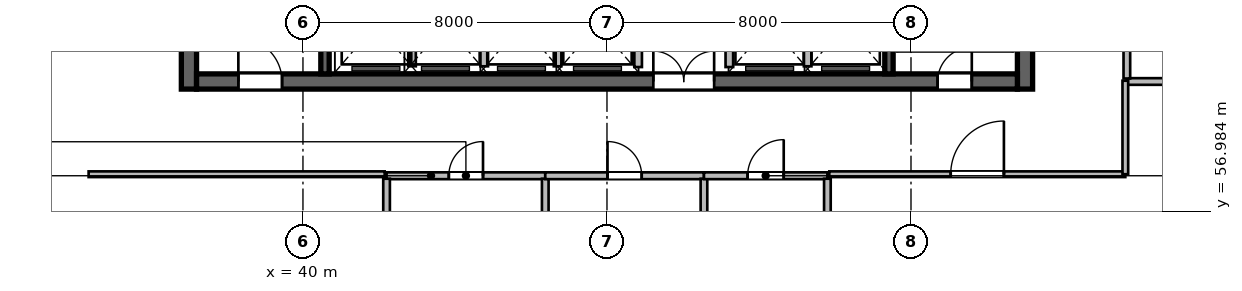
"""IFC4 building model, lengths in metres.
Left out: names, types, materials, properties, quantities, classifications, styles, units other than length and angle.
Written with IfcOpenShell. Run it as: python <this file> out.ifc"""

import sys

from ifc_helpers import new_model, si_unit, direction, frame, frame_2d, origin, place, context, subcontext, project, spatial, rectangle, extrude, source, transform, mapped, element, fill, save


model = new_model("IFC4")
c1 = context("Model", 3, precision=1e-05, world=origin(), true_north=direction((0.0, 1.0)))
c2 = subcontext(c1, "Body", "Model", "MODEL_VIEW")
j1 = project(units=[si_unit("LENGTHUNIT", "METRE"), si_unit("PLANEANGLEUNIT", "RADIAN")], contexts=[c1])
p1 = place(None, origin())
s1 = spatial("IfcSite", under=j1, at=p1, CompositionType="ELEMENT")
p2 = place(p1, origin())
s2 = spatial("IfcBuilding", under=s1, at=p2, CompositionType="ELEMENT")
p3 = place(p2, frame((0.0, 0.0, 303.0)))
s3 = spatial("IfcBuildingStorey", under=s2, at=p3, CompositionType="ELEMENT", Elevation=303.0)
m1 = source(origin(), c2, "Body", "SweptSolid", [
    extrude(rectangle(XDim=12.0, YDim=0.4, at=frame_2d((6.0, 0.0))), origin(), (0.0, 0.0, 1.0), 4.8),
])
for number, where, z_axis, x_axis in (
    (1, (37.0, 60.2, 0.0), (0.0, 0.0, 1.0), (0.0, 1.0, 0.0)),
    (2, (59.0, 60.2, 0.0), (0.0, 0.0, 1.0), (0.0, 1.0, 0.0)),
):
    element("IfcWall", number, at=place(p3, frame(where, z_axis=z_axis, x_axis=x_axis)), inside=s3, PredefinedType="SHEAR", context=c2, shape_type="MappedRepresentation", body=[
        mapped(m1, transform((0.0, 0.0, 0.0), scale=1.0)),
    ])
m2 = source(origin(), c2, "Body", "SweptSolid", [
    extrude(rectangle(XDim=21.6, YDim=0.4, at=frame_2d((10.8, 0.0))), origin(), (0.0, 0.0, 1.0), 4.8),
])
p4 = place(p3, frame((37.2, 60.4, 0.0), z_axis=(0.0, 0.0, 1.0), x_axis=(1.0, 0.0, 0.0)))
e3 = element("IfcWall", 3, at=p4, inside=s3, PredefinedType="SHEAR", context=c2, shape_type="MappedRepresentation", body=[
    mapped(m2, transform((0.0, 0.0, 0.0), scale=1.0)),
])
p5 = place(p4, frame((1.1, 0.0, 0.0)))
e4 = element("IfcOpeningElement", 4, at=p5, cuts=e3, PredefinedType="OPENING", context=c2, shape_type="SweptSolid", body=[
    extrude(rectangle(XDim=1.15, YDim=2.15, at=frame_2d((0.575, 1.075))), frame((0.0, 0.21, 0.0), z_axis=(0.0, -1.0, 0.0), x_axis=(1.0, 0.0, 0.0)), (0.0, 0.0, 1.0), 0.42),
])
p6 = place(p4, frame((19.5, 0.0, 0.0)))
e5 = element("IfcOpeningElement", 5, at=p6, cuts=e3, PredefinedType="OPENING", context=c2, shape_type="SweptSolid", body=[
    extrude(rectangle(XDim=0.9, YDim=2.1, at=frame_2d((0.45, 1.05))), frame((0.0, 0.21, 0.0), z_axis=(0.0, -1.0, 0.0), x_axis=(1.0, 0.0, 0.0)), (0.0, 0.0, 1.0), 0.42),
])
p7 = place(p4, frame((12.02, 0.0, 0.0)))
e6 = element("IfcOpeningElement", 6, at=p7, cuts=e3, PredefinedType="OPENING", context=c2, shape_type="SweptSolid", body=[
    extrude(rectangle(XDim=1.6, YDim=2.15, at=frame_2d((0.8, 1.075))), frame((0.0, 0.21, 0.0), z_axis=(0.0, -1.0, 0.0), x_axis=(1.0, 0.0, 0.0)), (0.0, 0.0, 1.0), 0.42),
])
m3 = source(origin(), c2, "Body", "SweptSolid", [
    extrude(rectangle(XDim=11.2, YDim=0.22, at=frame_2d((5.6, 0.0))), origin(), (0.0, 0.0, 1.0), 4.8),
])
p8 = place(p3, frame((40.58, 60.6, 0.0), z_axis=(0.0, 0.0, 1.0), x_axis=(0.0, 1.0, 0.0)))
e7 = element("IfcWall", 7, at=p8, inside=s3, PredefinedType="SHEAR", context=c2, shape_type="MappedRepresentation", body=[
    mapped(m3, transform((0.0, 0.0, 0.0), scale=1.0)),
])
p9 = place(p3, frame((55.42, 60.6, 0.0), z_axis=(0.0, 0.0, 1.0), x_axis=(0.0, 1.0, 0.0)))
e8 = element("IfcWall", 8, at=p9, inside=s3, PredefinedType="SHEAR", context=c2, shape_type="MappedRepresentation", body=[
    mapped(m3, transform((0.0, 0.0, 0.0), scale=1.0)),
])
p10 = place(p9, frame((9.645, 0.0, 0.0)))
e9 = element("IfcOpeningElement", 9, at=p10, cuts=e8, PredefinedType="OPENING", context=c2, shape_type="SweptSolid", body=[
    extrude(rectangle(XDim=1.15, YDim=2.15, at=frame_2d((0.575, 1.075))), frame((0.0, 0.12, 0.0), z_axis=(0.0, -1.0, 0.0), x_axis=(1.0, 0.0, 0.0)), (0.0, 0.0, 1.0), 0.24),
])
m4 = source(origin(), c2, "Body", "SweptSolid", [
    extrude(rectangle(XDim=2.24, YDim=0.2, at=frame_2d((1.12, 0.0))), origin(), (0.0, 0.0, 1.0), 4.54),
])
for number, where, z_axis, x_axis in (
    (10, (48.82, 60.78, 0.0), (0.0, 0.0, 1.0), (0.0, 1.0, 0.0)),
    (11, (51.22, 60.78, 0.0), (0.0, 0.0, 1.0), (0.0, 1.0, 0.0)),
):
    element("IfcWall", number, at=place(p3, frame(where, z_axis=z_axis, x_axis=x_axis)), inside=s3, PredefinedType="SOLIDWALL", context=c2, shape_type="MappedRepresentation", body=[
        mapped(m4, transform((0.0, 0.0, 0.0), scale=1.0)),
    ])
m5 = source(origin(), c2, "Body", "SweptSolid", [
    extrude(rectangle(XDim=2.2, YDim=0.2, at=frame_2d((1.1, 0.0))), origin(), (0.0, 0.0, 1.0), 4.54),
])
for number, where, z_axis, x_axis in (
    (12, (42.87, 60.8, 0.0), (0.0, 0.0, 1.0), (0.0, 1.0, 0.0)),
    (13, (44.77, 60.8, 0.0), (0.0, 0.0, 1.0), (0.0, 1.0, 0.0)),
    (14, (46.7, 60.8, 0.0), (0.0, 0.0, 1.0), (0.0, 1.0, 0.0)),
    (15, (53.28, 60.8, 0.0), (0.0, 0.0, 1.0), (0.0, 1.0, 0.0)),
):
    element("IfcWall", number, at=place(p3, frame(where, z_axis=z_axis, x_axis=x_axis)), inside=s3, PredefinedType="SOLIDWALL", context=c2, shape_type="MappedRepresentation", body=[
        mapped(m5, transform((0.0, 0.0, 0.0), scale=1.0)),
    ])
m6 = source(origin(), c2, "Body", "SweptSolid", [
    extrude(rectangle(XDim=4.176, YDim=0.18, at=frame_2d((2.088, 0.0))), origin(), (0.0, 0.0, 1.0), 4.54),
])
p11 = place(p3, frame((42.2, 57.92, 0.0), z_axis=(0.0, 0.0, 1.0), x_axis=(1.0, 0.0, 0.0)))
e16 = element("IfcWall", 16, at=p11, inside=s3, PredefinedType="PLUMBINGWALL", context=c2, shape_type="MappedRepresentation", body=[
    mapped(m6, transform((0.0, 0.0, 0.0), scale=1.0)),
])
p12 = place(p11, frame((1.638, 0.0, 0.0)))
e17 = element("IfcOpeningElement", 17, at=p12, cuts=e16, PredefinedType="OPENING", context=c2, shape_type="SweptSolid", body=[
    extrude(rectangle(XDim=0.9, YDim=2.08, at=frame_2d((0.45, 1.04))), frame((0.0, 0.1, 0.0), z_axis=(0.0, -1.0, 0.0), x_axis=(1.0, 0.0, 0.0)), (0.0, 0.0, 1.0), 0.2),
])
m7 = source(origin(), c2, "Body", "SweptSolid", [
    extrude(rectangle(XDim=3.763, YDim=0.175, at=frame_2d((1.881, 0.0))), origin(), (0.0, 0.0, 1.0), 4.54),
])
for number, where, z_axis, x_axis in (
    (18, (42.2, 54.079, 0.0), (0.0, 0.0, 1.0), (0.0, 1.0, 0.0)),
    (19, (46.376, 54.079, 0.0), (0.0, 0.0, 1.0), (0.0, 1.0, 0.0)),
):
    element("IfcWall", number, at=place(p3, frame(where, z_axis=z_axis, x_axis=x_axis)), inside=s3, PredefinedType="PARTITIONING", context=c2, shape_type="MappedRepresentation", body=[
        mapped(m7, transform((0.0, 0.0, 0.0), scale=1.0)),
    ])
p13 = place(p3, frame((46.376, 57.92, 0.0), z_axis=(0.0, 0.0, 1.0), x_axis=(1.0, 0.0, 0.0)))
e20 = element("IfcWall", 20, at=p13, inside=s3, PredefinedType="PLUMBINGWALL", context=c2, shape_type="MappedRepresentation", body=[
    mapped(m6, transform((0.0, 0.0, 0.0), scale=1.0)),
])
p14 = place(p13, frame((1.638, 0.0, 0.0)))
e21 = element("IfcOpeningElement", 21, at=p14, cuts=e20, PredefinedType="OPENING", context=c2, shape_type="SweptSolid", body=[
    extrude(rectangle(XDim=0.9, YDim=2.08, at=frame_2d((0.45, 1.04))), frame((0.0, 0.1, 0.0), z_axis=(0.0, -1.0, 0.0), x_axis=(1.0, 0.0, 0.0)), (0.0, 0.0, 1.0), 0.2),
])
p15 = place(p3, frame((50.552, 54.079, 0.0), z_axis=(0.0, 0.0, 1.0), x_axis=(0.0, 1.0, 0.0)))
e22 = element("IfcWall", 22, at=p15, inside=s3, PredefinedType="PARTITIONING", context=c2, shape_type="MappedRepresentation", body=[
    mapped(m7, transform((0.0, 0.0, 0.0), scale=1.0)),
])
m8 = source(origin(), c2, "Body", "SweptSolid", [
    extrude(rectangle(XDim=3.248, YDim=0.18, at=frame_2d((1.624, 0.0))), origin(), (0.0, 0.0, 1.0), 4.54),
])
p16 = place(p3, frame((50.552, 57.92, 0.0), z_axis=(0.0, 0.0, 1.0), x_axis=(1.0, 0.0, 0.0)))
e23 = element("IfcWall", 23, at=p16, inside=s3, PredefinedType="PLUMBINGWALL", context=c2, shape_type="MappedRepresentation", body=[
    mapped(m8, transform((0.0, 0.0, 0.0), scale=1.0)),
])
p17 = place(p16, frame((1.149, 0.0, 0.0)))
e24 = element("IfcOpeningElement", 24, at=p17, cuts=e23, PredefinedType="OPENING", context=c2, shape_type="SweptSolid", body=[
    extrude(rectangle(XDim=0.95, YDim=2.12, at=frame_2d((0.475, 1.06))), frame((0.0, 0.1, 0.0), z_axis=(0.0, -1.0, 0.0), x_axis=(1.0, 0.0, 0.0)), (0.0, 0.0, 1.0), 0.2),
])
p18 = place(p3, frame((53.8, 54.079, 0.0), z_axis=(0.0, 0.0, 1.0), x_axis=(0.0, 1.0, 0.0)))
e25 = element("IfcWall", 25, at=p18, inside=s3, PredefinedType="PARTITIONING", context=c2, shape_type="MappedRepresentation", body=[
    mapped(m7, transform((0.0, 0.0, 0.0), scale=1.0)),
])
m9 = source(origin(), c2, "Body", "SweptSolid", [
    extrude(rectangle(XDim=7.52, YDim=0.175, at=frame_2d((3.76, 0.0))), origin(), (0.0, 0.0, 1.0), 4.54),
])
p19 = place(p3, frame((61.68, 60.4, 0.0), z_axis=(0.0, 0.0, 1.0), x_axis=(1.0, 0.0, 0.0)))
e26 = element("IfcWall", 26, at=p19, inside=s3, PredefinedType="PARTITIONING", context=c2, shape_type="MappedRepresentation", body=[
    mapped(m9, transform((0.0, 0.0, 0.0), scale=1.0)),
])
m10 = source(origin(), c2, "Body", "SweptSolid", [
    extrude(rectangle(XDim=5.042, YDim=0.175, at=frame_2d((2.521, 0.0))), origin(), (0.0, 0.0, 1.0), 4.54),
])
p20 = place(p3, frame((61.68, 60.479, 0.0), z_axis=(0.0, 0.0, 1.0), x_axis=(0.0, 1.0, 0.0)))
e27 = element("IfcWall", 27, at=p20, inside=s3, PredefinedType="PARTITIONING", context=c2, shape_type="MappedRepresentation", body=[
    mapped(m10, transform((0.0, 0.0, 0.0), scale=1.0)),
])
p21 = place(p20, frame((1.921, 0.0, 0.0)))
e28 = element("IfcOpeningElement", 28, at=p21, cuts=e27, PredefinedType="OPENING", context=c2, shape_type="SweptSolid", body=[
    extrude(rectangle(XDim=1.2, YDim=2.15, at=frame_2d((0.6, 1.075))), frame((0.0, 0.098, 0.0), z_axis=(0.0, -1.0, 0.0), x_axis=(1.0, 0.0, 0.0)), (0.0, 0.0, 1.0), 0.195),
])
m11 = source(origin(), c2, "Body", "SweptSolid", [
    extrude(rectangle(XDim=7.79, YDim=0.15, at=frame_2d((3.895, 0.0))), origin(), (0.0, 0.0, 1.0), 3.912),
])
p22 = place(p3, frame((34.36, 57.96, 0.0), z_axis=(0.0, 0.0, 1.0), x_axis=(1.0, 0.0, 0.0)))
e29 = element("IfcWall", 29, at=p22, inside=s3, PredefinedType="PARTITIONING", context=c2, shape_type="MappedRepresentation", body=[
    mapped(m11, transform((0.0, 0.0, 0.0), scale=1.0)),
])
p23 = place(p3, frame((53.85, 57.96, 0.0), z_axis=(0.0, 0.0, 1.0), x_axis=(1.0, 0.0, 0.0)))
e30 = element("IfcWall", 30, at=p23, inside=s3, PredefinedType="PARTITIONING", context=c2, shape_type="MappedRepresentation", body=[
    mapped(m11, transform((0.0, 0.0, 0.0), scale=1.0)),
])
p24 = place(p23, frame((3.195, 0.0, 0.0)))
e31 = element("IfcOpeningElement", 31, at=p24, cuts=e30, PredefinedType="OPENING", context=c2, shape_type="SweptSolid", body=[
    extrude(rectangle(XDim=1.4, YDim=2.15, at=frame_2d((0.7, 1.075))), frame((0.0, 0.085, 0.0), z_axis=(0.0, -1.0, 0.0), x_axis=(1.0, 0.0, 0.0)), (0.0, 0.0, 1.0), 0.17),
])
m12 = source(origin(), c2, "Body", "SweptSolid", [
    extrude(rectangle(XDim=2.46, YDim=0.15, at=frame_2d((1.23, 0.0))), origin(), (0.0, 0.0, 1.0), 4.54),
])
p25 = place(p3, frame((61.64, 57.96, 0.0), z_axis=(0.0, 0.0, 1.0), x_axis=(0.0, 1.0, 0.0)))
e32 = element("IfcWall", 32, at=p25, inside=s3, PredefinedType="PARTITIONING", context=c2, shape_type="MappedRepresentation", body=[
    mapped(m12, transform((0.0, 0.0, 0.0), scale=1.0)),
])
m13 = source(origin(), c2, "Body", "SweptSolid", [
    extrude(rectangle(XDim=1.15, YDim=2.15, at=frame_2d((0.575, 1.075))), frame((0.0, 0.025, 0.0), z_axis=(0.0, -1.0, 0.0), x_axis=(1.0, 0.0, 0.0)), (0.0, 0.0, 1.0), 0.05),
])
p26 = place(p5, origin())
e33 = element("IfcDoor", 33, at=p26, inside=s3, OperationType="SINGLE_SWING_LEFT", PredefinedType="DOOR", context=c2, shape_type="MappedRepresentation", body=[
    mapped(m13, transform((0.0, 0.0, 0.0), scale=1.0)),
])
fill(e4, e33)
m14 = source(origin(), c2, "Body", "SweptSolid", [
    extrude(rectangle(XDim=0.9, YDim=2.1, at=frame_2d((0.45, 1.05))), frame((0.0, 0.025, 0.0), z_axis=(0.0, -1.0, 0.0), x_axis=(1.0, 0.0, 0.0)), (0.0, 0.0, 1.0), 0.05),
])
p27 = place(p6, origin())
e34 = element("IfcDoor", 34, at=p27, inside=s3, OperationType="SINGLE_SWING_RIGHT", PredefinedType="DOOR", context=c2, shape_type="MappedRepresentation", body=[
    mapped(m14, transform((0.0, 0.0, 0.0), scale=1.0)),
])
fill(e5, e34)
m15 = source(origin(), c2, "Body", "SweptSolid", [
    extrude(rectangle(XDim=1.6, YDim=2.15, at=frame_2d((0.8, 1.075))), frame((0.0, 0.025, 0.0), z_axis=(0.0, -1.0, 0.0), x_axis=(1.0, 0.0, 0.0)), (0.0, 0.0, 1.0), 0.05),
])
p28 = place(p7, origin())
e35 = element("IfcDoor", 35, at=p28, inside=s3, OperationType="DOUBLE_DOOR_SINGLE_SWING", PredefinedType="DOOR", context=c2, shape_type="MappedRepresentation", body=[
    mapped(m15, transform((0.0, 0.0, 0.0), scale=1.0)),
])
fill(e6, e35)
m16 = source(origin(), c2, "Body", "SweptSolid", [
    extrude(rectangle(XDim=0.9, YDim=2.08, at=frame_2d((0.45, 1.04))), frame((0.0, 0.025, 0.0), z_axis=(0.0, -1.0, 0.0), x_axis=(1.0, 0.0, 0.0)), (0.0, 0.0, 1.0), 0.05),
])
p29 = place(p12, origin())
e36 = element("IfcDoor", 36, at=p29, inside=s3, OperationType="SINGLE_SWING_RIGHT", PredefinedType="DOOR", context=c2, shape_type="MappedRepresentation", body=[
    mapped(m16, transform((0.0, 0.0, 0.0), scale=1.0)),
])
fill(e17, e36)
p30 = place(p14, origin())
e37 = element("IfcDoor", 37, at=p30, inside=s3, OperationType="SINGLE_SWING_LEFT", PredefinedType="DOOR", context=c2, shape_type="MappedRepresentation", body=[
    mapped(m16, transform((0.0, 0.0, 0.0), scale=1.0)),
])
fill(e21, e37)
m17 = source(origin(), c2, "Body", "SweptSolid", [
    extrude(rectangle(XDim=0.95, YDim=2.12, at=frame_2d((0.475, 1.06))), frame((0.0, 0.025, 0.0), z_axis=(0.0, -1.0, 0.0), x_axis=(1.0, 0.0, 0.0)), (0.0, 0.0, 1.0), 0.05),
])
p31 = place(p17, origin())
e38 = element("IfcDoor", 38, at=p31, inside=s3, OperationType="SINGLE_SWING_RIGHT", PredefinedType="DOOR", context=c2, shape_type="MappedRepresentation", body=[
    mapped(m17, transform((0.0, 0.0, 0.0), scale=1.0)),
])
fill(e24, e38)
m18 = source(origin(), c2, "Body", "SweptSolid", [
    extrude(rectangle(XDim=1.4, YDim=2.15, at=frame_2d((0.7, 1.075))), frame((0.0, 0.025, 0.0), z_axis=(0.0, -1.0, 0.0), x_axis=(1.0, 0.0, 0.0)), (0.0, 0.0, 1.0), 0.05),
])
p32 = place(p24, origin())
e39 = element("IfcDoor", 39, at=p32, inside=s3, OperationType="SINGLE_SWING_RIGHT", PredefinedType="DOOR", context=c2, shape_type="MappedRepresentation", body=[
    mapped(m18, transform((0.0, 0.0, 0.0), scale=1.0)),
])
fill(e31, e39)
save(model, sys.argv[1])
